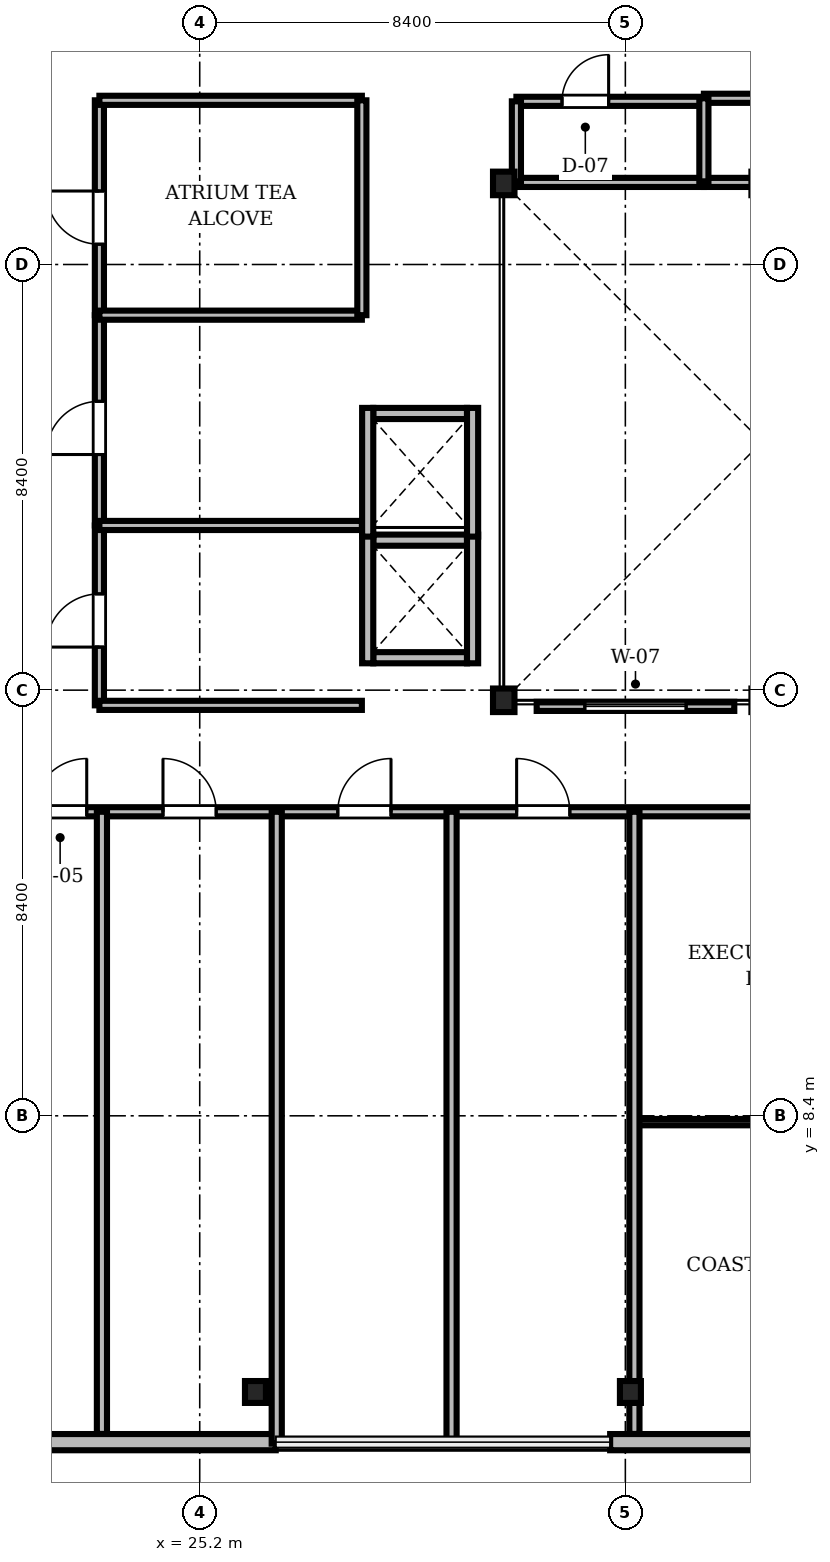
"""IFC4 building model, lengths in metres.
Left out: names, types, materials, properties, quantities, classifications, styles, units other than length and angle.
Written with IfcOpenShell. Run it as: python <this file> out.ifc"""

import sys

from ifc_helpers import new_model, si_unit, direction, frame, frame_2d, origin, origin_2d, place, context, subcontext, project, spatial, rectangle, i_section, extrude, source, transform, mapped, element, fill, save


model = new_model("IFC4")
c1 = context("Model", 3, precision=1e-05, world=origin(), true_north=direction((0.0, 1.0)))
c2 = subcontext(c1, "Body", "Model", "MODEL_VIEW")
j1 = project(units=[si_unit("LENGTHUNIT", "METRE"), si_unit("PLANEANGLEUNIT", "RADIAN")], contexts=[c1])
p1 = place(None, origin())
s1 = spatial("IfcSite", under=j1, at=p1, CompositionType="ELEMENT")
p2 = place(p1, origin())
s2 = spatial("IfcBuilding", under=s1, at=p2, CompositionType="ELEMENT")
p3 = place(p2, frame((0.0, 0.0, 137.2)))
s3 = spatial("IfcBuildingStorey", under=s2, at=p3, CompositionType="ELEMENT", Elevation=137.2)
m1 = source(origin(), c2, "Body", "SweptSolid", [
    extrude(i_section(OverallWidth=0.424, OverallDepth=0.465, WebThickness=0.035, FlangeThickness=0.056, FilletRadius=0.015, at=origin_2d()), origin(), (0.0, 0.0, 1.0), 3.46),
])
for number, where, z_axis, x_axis in (
    (1, (31.2, 16.6, 0.0), (0.0, 0.0, 1.0), (1.0, 0.0, 0.0)),
    (2, (31.2, 26.8, 0.0), (0.0, 0.0, 1.0), (1.0, 0.0, 0.0)),
):
    element("IfcColumn", number, at=place(p3, frame(where, z_axis=z_axis, x_axis=x_axis)), inside=s3, PredefinedType="COLUMN", context=c2, shape_type="MappedRepresentation", body=[
        mapped(m1, transform((0.0, 0.0, 0.0), scale=1.0)),
    ])
m2 = source(origin(), c2, "Body", "SweptSolid", [
    extrude(i_section(OverallWidth=0.414, OverallDepth=0.432, WebThickness=0.026, FlangeThickness=0.04, FilletRadius=0.015, at=origin_2d()), origin(), (0.0, 0.0, 1.0), 3.46),
])
for number, where, z_axis, x_axis in (
    (3, (26.3, 2.95, 0.0), (0.0, 0.0, 1.0), (1.0, 0.0, 0.0)),
    (4, (33.7, 2.95, 0.0), (0.0, 0.0, 1.0), (1.0, 0.0, 0.0)),
):
    element("IfcColumn", number, at=place(p3, frame(where, z_axis=z_axis, x_axis=x_axis)), inside=s3, PredefinedType="COLUMN", context=c2, shape_type="MappedRepresentation", body=[
        mapped(m2, transform((0.0, 0.0, 0.0), scale=1.0)),
    ])
m3 = source(origin(), c2, "Body", "SweptSolid", [
    extrude(rectangle(XDim=15.6, YDim=0.32, at=frame_2d((7.8, 0.0))), origin(), (0.0, 0.0, 1.0), 3.46),
])
p4 = place(p3, frame((11.1, 1.96, 0.0), z_axis=(0.0, 0.0, 1.0), x_axis=(1.0, 0.0, 0.0)))
e5 = element("IfcWall", 5, at=p4, inside=s3, PredefinedType="SOLIDWALL", context=c2, shape_type="MappedRepresentation", body=[
    mapped(m3, transform((0.0, 0.0, 0.0), scale=1.0)),
])
m4 = source(origin(), c2, "Body", "SweptSolid", [
    extrude(rectangle(XDim=2.2, YDim=2.4, at=frame_2d((1.1, 1.2))), frame((0.0, 0.17, 0.0), z_axis=(0.0, -1.0, 0.0), x_axis=(1.0, 0.0, 0.0)), (0.0, 0.0, 1.0), 0.34),
])
p5 = place(p4, frame((3.005, 0.0, 0.72)))
e6 = element("IfcOpeningElement", 6, at=p5, cuts=e5, PredefinedType="OPENING", context=c2, shape_type="MappedRepresentation", body=[
    mapped(m4, transform((0.0, 0.0, 0.0), scale=1.0)),
])
p6 = place(p3, frame((33.3, 1.96, 0.0), z_axis=(0.0, 0.0, 1.0), x_axis=(1.0, 0.0, 0.0)))
e7 = element("IfcWall", 7, at=p6, inside=s3, PredefinedType="SOLIDWALL", context=c2, shape_type="MappedRepresentation", body=[
    mapped(m3, transform((0.0, 0.0, 0.0), scale=1.0)),
])
m5 = source(origin(), c2, "Body", "SweptSolid", [
    extrude(rectangle(XDim=1.4, YDim=2.3, at=frame_2d((0.7, 1.15))), frame((0.0, 0.17, 0.0), z_axis=(0.0, -1.0, 0.0), x_axis=(1.0, 0.0, 0.0)), (0.0, 0.0, 1.0), 0.34),
])
p7 = place(p6, frame((4.59, 0.0, 0.0)))
e8 = element("IfcOpeningElement", 8, at=p7, cuts=e7, PredefinedType="OPENING", context=c2, shape_type="MappedRepresentation", body=[
    mapped(m5, transform((0.0, 0.0, 0.0), scale=1.0)),
])
p8 = place(p6, frame((10.395, 0.0, 0.72)))
e9 = element("IfcOpeningElement", 9, at=p8, cuts=e7, PredefinedType="OPENING", context=c2, shape_type="MappedRepresentation", body=[
    mapped(m4, transform((0.0, 0.0, 0.0), scale=1.0)),
])
m6 = source(origin(), c2, "Body", "SweptSolid", [
    extrude(rectangle(XDim=1.85, YDim=0.22, at=frame_2d((0.925, 0.0))), origin(), (0.0, 0.0, 1.0), 3.46),
])
for number, where, z_axis, x_axis in (
    (10, (28.625, 17.44, 0.0), (0.0, 0.0, 1.0), (1.0, 0.0, 0.0)),
    (11, (28.625, 19.76, 0.0), (0.0, 0.0, 1.0), (1.0, 0.0, 0.0)),
):
    element("IfcWall", number, at=place(p3, frame(where, z_axis=z_axis, x_axis=x_axis)), inside=s3, PredefinedType="SOLIDWALL", context=c2, shape_type="MappedRepresentation", body=[
        mapped(m6, transform((0.0, 0.0, 0.0), scale=1.0)),
    ])
m7 = source(origin(), c2, "Body", "SweptSolid", [
    extrude(rectangle(XDim=2.54, YDim=0.22, at=frame_2d((1.27, 0.0))), origin(), (0.0, 0.0, 1.0), 3.46),
])
for number, where, z_axis, x_axis in (
    (12, (28.515, 17.33, 0.0), (0.0, 0.0, 1.0), (0.0, 1.0, 0.0)),
    (13, (30.585, 17.33, 0.0), (0.0, 0.0, 1.0), (0.0, 1.0, 0.0)),
):
    element("IfcWall", number, at=place(p3, frame(where, z_axis=z_axis, x_axis=x_axis)), inside=s3, PredefinedType="SOLIDWALL", context=c2, shape_type="MappedRepresentation", body=[
        mapped(m7, transform((0.0, 0.0, 0.0), scale=1.0)),
    ])
p9 = place(p3, frame((28.625, 22.26, 0.0), z_axis=(0.0, 0.0, 1.0), x_axis=(1.0, 0.0, 0.0)))
e14 = element("IfcWall", 14, at=p9, inside=s3, PredefinedType="SOLIDWALL", context=c2, shape_type="MappedRepresentation", body=[
    mapped(m6, transform((0.0, 0.0, 0.0), scale=1.0)),
])
for number, where, z_axis, x_axis in (
    (15, (28.515, 19.83, 0.0), (0.0, 0.0, 1.0), (0.0, 1.0, 0.0)),
    (16, (30.585, 19.83, 0.0), (0.0, 0.0, 1.0), (0.0, 1.0, 0.0)),
):
    element("IfcWall", number, at=place(p3, frame(where, z_axis=z_axis, x_axis=x_axis)), inside=s3, PredefinedType="SOLIDWALL", context=c2, shape_type="MappedRepresentation", body=[
        mapped(m7, transform((0.0, 0.0, 0.0), scale=1.0)),
    ])
m8 = source(origin(), c2, "Body", "SweptSolid", [
    extrude(rectangle(XDim=46.156, YDim=0.18, at=frame_2d((23.078, 0.0))), origin(), (0.0, 0.0, 1.0), 2.702),
])
p10 = place(p3, frame((6.922, 14.4, 0.0), z_axis=(0.0, 0.0, 1.0), x_axis=(1.0, 0.0, 0.0)))
e17 = element("IfcWall", 17, at=p10, inside=s3, PredefinedType="PARTITIONING", context=c2, shape_type="MappedRepresentation", body=[
    mapped(m8, transform((0.0, 0.0, 0.0), scale=1.0)),
])
m9 = source(origin(), c2, "Body", "SweptSolid", [
    extrude(rectangle(XDim=1.05, YDim=2.2, at=frame_2d((0.525, 1.1))), frame((0.0, 0.1, 0.0), z_axis=(0.0, -1.0, 0.0), x_axis=(1.0, 0.0, 0.0)), (0.0, 0.0, 1.0), 0.2),
])
p11 = place(p10, frame((14.998, 0.0, 0.0)))
e18 = element("IfcOpeningElement", 18, at=p11, cuts=e17, PredefinedType="OPENING", context=c2, shape_type="MappedRepresentation", body=[
    mapped(m9, transform((0.0, 0.0, 0.0), scale=1.0)),
])
p12 = place(p10, frame((17.553, 0.0, 0.0)))
e19 = element("IfcOpeningElement", 19, at=p12, cuts=e17, PredefinedType="OPENING", context=c2, shape_type="MappedRepresentation", body=[
    mapped(m9, transform((0.0, 0.0, 0.0), scale=1.0)),
])
p13 = place(p10, frame((21.003, 0.0, 0.0)))
e20 = element("IfcOpeningElement", 20, at=p13, cuts=e17, PredefinedType="OPENING", context=c2, shape_type="MappedRepresentation", body=[
    mapped(m9, transform((0.0, 0.0, 0.0), scale=1.0)),
])
p14 = place(p10, frame((24.532, 0.0, 0.0)))
e21 = element("IfcOpeningElement", 21, at=p14, cuts=e17, PredefinedType="OPENING", context=c2, shape_type="MappedRepresentation", body=[
    mapped(m9, transform((0.0, 0.0, 0.0), scale=1.0)),
])
p15 = place(p10, frame((29.342, 0.0, 0.0)))
e22 = element("IfcOpeningElement", 22, at=p15, cuts=e17, PredefinedType="OPENING", context=c2, shape_type="MappedRepresentation", body=[
    mapped(m9, transform((0.0, 0.0, 0.0), scale=1.0)),
])
p16 = place(p10, frame((34.073, 0.0, 0.0)))
e23 = element("IfcOpeningElement", 23, at=p16, cuts=e17, PredefinedType="OPENING", context=c2, shape_type="MappedRepresentation", body=[
    mapped(m9, transform((0.0, 0.0, 0.0), scale=1.0)),
])
p17 = place(p10, frame((37.822, 0.0, 0.0)))
e24 = element("IfcOpeningElement", 24, at=p17, cuts=e17, PredefinedType="OPENING", context=c2, shape_type="MappedRepresentation", body=[
    mapped(m9, transform((0.0, 0.0, 0.0), scale=1.0)),
])
p18 = place(p10, frame((41.828, 0.0, 0.0)))
e25 = element("IfcOpeningElement", 25, at=p18, cuts=e17, PredefinedType="OPENING", context=c2, shape_type="MappedRepresentation", body=[
    mapped(m9, transform((0.0, 0.0, 0.0), scale=1.0)),
])
m10 = source(origin(), c2, "Body", "SweptSolid", [
    extrude(rectangle(XDim=6.011, YDim=0.125, at=frame_2d((3.005, 0.0))), origin(), (0.0, 0.0, 1.0), 2.852),
])
p19 = place(p3, frame((33.779, 8.275, 0.0), z_axis=(0.0, 0.0, 1.0), x_axis=(1.0, 0.0, 0.0)))
e26 = element("IfcWall", 26, at=p19, inside=s3, PredefinedType="PARTITIONING", context=c2, shape_type="MappedRepresentation", body=[
    mapped(m10, transform((0.0, 0.0, 0.0), scale=1.0)),
])
m11 = source(origin(), c2, "Body", "SweptSolid", [
    extrude(rectangle(XDim=0.95, YDim=2.15, at=frame_2d((0.475, 1.075))), frame((0.0, 0.073, 0.0), z_axis=(0.0, -1.0, 0.0), x_axis=(1.0, 0.0, 0.0)), (0.0, 0.0, 1.0), 0.145),
])
p20 = place(p19, frame((2.525, 0.0, 0.0)))
e27 = element("IfcOpeningElement", 27, at=p20, cuts=e26, PredefinedType="OPENING", context=c2, shape_type="MappedRepresentation", body=[
    mapped(m11, transform((0.0, 0.0, 0.0), scale=1.0)),
])
m12 = source(origin(), c2, "Body", "SweptSolid", [
    extrude(rectangle(XDim=4.24, YDim=0.18, at=frame_2d((2.12, 0.0))), origin(), (0.0, 0.0, 1.0), 2.852),
])
p21 = place(p3, frame((23.22, 24.2, 0.0), z_axis=(0.0, 0.0, 1.0), x_axis=(0.0, 1.0, 0.0)))
e28 = element("IfcWall", 28, at=p21, inside=s3, PredefinedType="PARTITIONING", context=c2, shape_type="MappedRepresentation", body=[
    mapped(m12, transform((0.0, 0.0, 0.0), scale=1.0)),
])
p22 = place(p21, frame((1.4, 0.0, 0.0)))
e29 = element("IfcOpeningElement", 29, at=p22, cuts=e28, PredefinedType="OPENING", context=c2, shape_type="MappedRepresentation", body=[
    mapped(m9, transform((0.0, 0.0, 0.0), scale=1.0)),
])
m13 = source(origin(), c2, "Body", "SweptSolid", [
    extrude(rectangle(XDim=4.15, YDim=0.18, at=frame_2d((2.075, 0.0))), origin(), (0.0, 0.0, 1.0), 3.122),
])
p23 = place(p3, frame((23.22, 20.05, 0.0), z_axis=(0.0, 0.0, 1.0), x_axis=(0.0, 1.0, 0.0)))
e30 = element("IfcWall", 30, at=p23, inside=s3, PredefinedType="PARTITIONING", context=c2, shape_type="MappedRepresentation", body=[
    mapped(m13, transform((0.0, 0.0, 0.0), scale=1.0)),
])
p24 = place(p23, frame((1.4, 0.0, 0.0)))
e31 = element("IfcOpeningElement", 31, at=p24, cuts=e30, PredefinedType="OPENING", context=c2, shape_type="MappedRepresentation", body=[
    mapped(m9, transform((0.0, 0.0, 0.0), scale=1.0)),
])
m14 = source(origin(), c2, "Body", "SweptSolid", [
    extrude(rectangle(XDim=3.7, YDim=0.18, at=frame_2d((1.85, 0.0))), origin(), (0.0, 0.0, 1.0), 3.092),
])
p25 = place(p3, frame((31.45, 28.42, 0.0), z_axis=(0.0, 0.0, 1.0), x_axis=(1.0, 0.0, 0.0)))
e32 = element("IfcWall", 32, at=p25, inside=s3, PredefinedType="PARTITIONING", context=c2, shape_type="MappedRepresentation", body=[
    mapped(m14, transform((0.0, 0.0, 0.0), scale=1.0)),
])
m15 = source(origin(), c2, "Body", "SweptSolid", [
    extrude(rectangle(XDim=0.92, YDim=2.1, at=frame_2d((0.46, 1.05))), frame((0.0, 0.1, 0.0), z_axis=(0.0, -1.0, 0.0), x_axis=(1.0, 0.0, 0.0)), (0.0, 0.0, 1.0), 0.2),
])
p26 = place(p25, frame((0.9, 0.0, 0.0)))
e33 = element("IfcOpeningElement", 33, at=p26, cuts=e32, PredefinedType="OPENING", context=c2, shape_type="MappedRepresentation", body=[
    mapped(m15, transform((0.0, 0.0, 0.0), scale=1.0)),
])
m16 = source(origin(), c2, "Body", "SweptSolid", [
    extrude(rectangle(XDim=3.55, YDim=0.18, at=frame_2d((1.775, 0.0))), origin(), (0.0, 0.0, 1.0), 2.852),
])
p27 = place(p3, frame((23.22, 16.5, 0.0), z_axis=(0.0, 0.0, 1.0), x_axis=(0.0, 1.0, 0.0)))
e34 = element("IfcWall", 34, at=p27, inside=s3, PredefinedType="PARTITIONING", context=c2, shape_type="MappedRepresentation", body=[
    mapped(m16, transform((0.0, 0.0, 0.0), scale=1.0)),
])
p28 = place(p27, frame((1.15, 0.0, 0.0)))
e35 = element("IfcOpeningElement", 35, at=p28, cuts=e34, PredefinedType="OPENING", context=c2, shape_type="MappedRepresentation", body=[
    mapped(m9, transform((0.0, 0.0, 0.0), scale=1.0)),
])
m17 = source(origin(), c2, "Body", "SweptSolid", [
    extrude(rectangle(XDim=3.37, YDim=0.18, at=frame_2d((1.685, 0.0))), origin(), (0.0, 0.0, 1.0), 3.46),
])
p29 = place(p3, frame((35.15, 28.48, 0.0), z_axis=(0.0, 0.0, 1.0), x_axis=(1.0, 0.0, 0.0)))
e36 = element("IfcWall", 36, at=p29, inside=s3, PredefinedType="PARTITIONING", context=c2, shape_type="MappedRepresentation", body=[
    mapped(m17, transform((0.0, 0.0, 0.0), scale=1.0)),
])
m18 = source(origin(), c2, "Body", "SweptSolid", [
    extrude(rectangle(XDim=0.95, YDim=2.15, at=frame_2d((0.475, 1.075))), frame((0.0, 0.1, 0.0), z_axis=(0.0, -1.0, 0.0), x_axis=(1.0, 0.0, 0.0)), (0.0, 0.0, 1.0), 0.2),
])
p30 = place(p29, frame((1.775, 0.0, 0.0)))
e37 = element("IfcOpeningElement", 37, at=p30, cuts=e36, PredefinedType="OPENING", context=c2, shape_type="MappedRepresentation", body=[
    mapped(m18, transform((0.0, 0.0, 0.0), scale=1.0)),
])
m19 = source(origin(), c2, "Body", "SweptSolid", [
    extrude(rectangle(XDim=12.278, YDim=0.2, at=frame_2d((6.139, 0.0))), origin(), (0.0, 0.0, 1.0), 2.702),
])
p31 = place(p3, frame((23.27, 2.122, 0.0), z_axis=(0.0, 0.0, 1.0), x_axis=(0.0, 1.0, 0.0)))
e38 = element("IfcWall", 38, at=p31, inside=s3, PredefinedType="PARTITIONING", context=c2, shape_type="MappedRepresentation", body=[
    mapped(m19, transform((0.0, 0.0, 0.0), scale=1.0)),
])
m20 = source(origin(), c2, "Body", "SweptSolid", [
    extrude(rectangle(XDim=12.47, YDim=0.2, at=frame_2d((6.235, 0.0))), origin(), (0.0, 0.0, 1.0), 2.702),
])
for number, where, z_axis, x_axis in (
    (39, (26.72, 1.93, 0.0), (0.0, 0.0, 1.0), (0.0, 1.0, 0.0)),
    (40, (30.17, 1.93, 0.0), (0.0, 0.0, 1.0), (0.0, 1.0, 0.0)),
):
    element("IfcWall", number, at=place(p3, frame(where, z_axis=z_axis, x_axis=x_axis)), inside=s3, PredefinedType="PARTITIONING", context=c2, shape_type="MappedRepresentation", body=[
        mapped(m20, transform((0.0, 0.0, 0.0), scale=1.0)),
    ])
p32 = place(p3, frame((33.779, 2.122, 0.0), z_axis=(0.0, 0.0, 1.0), x_axis=(0.0, 1.0, 0.0)))
e41 = element("IfcWall", 41, at=p32, inside=s3, PredefinedType="PARTITIONING", context=c2, shape_type="MappedRepresentation", body=[
    mapped(m19, transform((0.0, 0.0, 0.0), scale=1.0)),
])
m21 = source(origin(), c2, "Body", "SweptSolid", [
    extrude(rectangle(XDim=5.18, YDim=0.18, at=frame_2d((2.59, 0.0))), origin(), (0.0, 0.0, 1.0), 3.46),
])
for number, where, z_axis, x_axis in (
    (42, (23.22, 16.5, 0.0), (0.0, 0.0, 1.0), (1.0, 0.0, 0.0)),
    (43, (23.22, 20.05, 0.0), (0.0, 0.0, 1.0), (1.0, 0.0, 0.0)),
    (44, (23.22, 24.2, 0.0), (0.0, 0.0, 1.0), (1.0, 0.0, 0.0)),
    (45, (23.22, 28.44, 0.0), (0.0, 0.0, 1.0), (1.0, 0.0, 0.0)),
):
    element("IfcWall", number, at=place(p3, frame(where, z_axis=z_axis, x_axis=x_axis)), inside=s3, PredefinedType="PARTITIONING", context=c2, shape_type="MappedRepresentation", body=[
        mapped(m21, transform((0.0, 0.0, 0.0), scale=1.0)),
    ])
p33 = place(p3, frame((28.4, 24.2, 0.0), z_axis=(0.0, 0.0, 1.0), x_axis=(0.0, 1.0, 0.0)))
e46 = element("IfcWall", 46, at=p33, inside=s3, PredefinedType="PARTITIONING", context=c2, shape_type="MappedRepresentation", body=[
    mapped(m12, transform((0.0, 0.0, 0.0), scale=1.0)),
])
m22 = source(origin(), c2, "Body", "SweptSolid", [
    extrude(rectangle(XDim=3.7, YDim=0.18, at=frame_2d((1.85, 0.0))), origin(), (0.0, 0.0, 1.0), 3.002),
])
p34 = place(p3, frame((31.45, 26.82, 0.0), z_axis=(0.0, 0.0, 1.0), x_axis=(1.0, 0.0, 0.0)))
e47 = element("IfcWall", 47, at=p34, inside=s3, PredefinedType="PARTITIONING", context=c2, shape_type="MappedRepresentation", body=[
    mapped(m22, transform((0.0, 0.0, 0.0), scale=1.0)),
])
m23 = source(origin(), c2, "Body", "SweptSolid", [
    extrude(rectangle(XDim=3.37, YDim=0.18, at=frame_2d((1.685, 0.0))), origin(), (0.0, 0.0, 1.0), 3.002),
])
p35 = place(p3, frame((35.15, 26.82, 0.0), z_axis=(0.0, 0.0, 1.0), x_axis=(1.0, 0.0, 0.0)))
e48 = element("IfcWall", 48, at=p35, inside=s3, PredefinedType="PARTITIONING", context=c2, shape_type="MappedRepresentation", body=[
    mapped(m23, transform((0.0, 0.0, 0.0), scale=1.0)),
])
m24 = source(origin(), c2, "Body", "SweptSolid", [
    extrude(rectangle(XDim=1.66, YDim=0.18, at=frame_2d((0.83, 0.0))), origin(), (0.0, 0.0, 1.0), 3.002),
])
p36 = place(p3, frame((35.15, 26.82, 0.0), z_axis=(0.0, 0.0, 1.0), x_axis=(0.0, 1.0, 0.0)))
e49 = element("IfcWall", 49, at=p36, inside=s3, PredefinedType="PARTITIONING", context=c2, shape_type="MappedRepresentation", body=[
    mapped(m24, transform((0.0, 0.0, 0.0), scale=1.0)),
])
m25 = source(origin(), c2, "Body", "SweptSolid", [
    extrude(rectangle(XDim=1.6, YDim=0.18, at=frame_2d((0.8, 0.0))), origin(), (0.0, 0.0, 1.0), 3.002),
])
p37 = place(p3, frame((31.45, 26.82, 0.0), z_axis=(0.0, 0.0, 1.0), x_axis=(0.0, 1.0, 0.0)))
e50 = element("IfcWall", 50, at=p37, inside=s3, PredefinedType="PARTITIONING", context=c2, shape_type="MappedRepresentation", body=[
    mapped(m25, transform((0.0, 0.0, 0.0), scale=1.0)),
])
m26 = source(origin(), c2, "Body", "SweptSolid", [
    extrude(rectangle(XDim=3.9, YDim=0.18, at=frame_2d((1.95, 0.0))), origin(), (0.0, 0.0, 1.0), 3.002),
])
p38 = place(p3, frame((31.85, 16.48, 0.0), z_axis=(0.0, 0.0, 1.0), x_axis=(1.0, 0.0, 0.0)))
e51 = element("IfcWall", 51, at=p38, inside=s3, PredefinedType="PARTITIONING", context=c2, shape_type="MappedRepresentation", body=[
    mapped(m26, transform((0.0, 0.0, 0.0), scale=1.0)),
])
m27 = source(origin(), c2, "Body", "SweptSolid", [
    extrude(rectangle(XDim=2.0, YDim=1.9, at=frame_2d((1.0, 0.95))), frame((0.0, 0.1, 0.0), z_axis=(0.0, -1.0, 0.0), x_axis=(1.0, 0.0, 0.0)), (0.0, 0.0, 1.0), 0.2),
])
p39 = place(p38, frame((0.95, 0.0, 0.55)))
e52 = element("IfcOpeningElement", 52, at=p39, cuts=e51, PredefinedType="OPENING", context=c2, shape_type="MappedRepresentation", body=[
    mapped(m27, transform((0.0, 0.0, 0.0), scale=1.0)),
])
m28 = source(origin(), c2, "Body", "SweptSolid", [
    extrude(rectangle(XDim=1.05, YDim=2.2, at=frame_2d((0.525, 1.1))), frame((0.0, 0.025, 0.0), z_axis=(0.0, -1.0, 0.0), x_axis=(1.0, 0.0, 0.0)), (0.0, 0.0, 1.0), 0.05),
])
p40 = place(p11, origin())
e53 = element("IfcDoor", 53, at=p40, inside=s3, OperationType="SINGLE_SWING_RIGHT", PredefinedType="DOOR", context=c2, shape_type="MappedRepresentation", body=[
    mapped(m28, transform((0.0, 0.0, 0.0), scale=1.0)),
])
fill(e18, e53)
p41 = place(p12, origin())
e54 = element("IfcDoor", 54, at=p41, inside=s3, OperationType="SINGLE_SWING_LEFT", PredefinedType="DOOR", context=c2, shape_type="MappedRepresentation", body=[
    mapped(m28, transform((0.0, 0.0, 0.0), scale=1.0)),
])
fill(e19, e54)
p42 = place(p13, origin())
e55 = element("IfcDoor", 55, at=p42, inside=s3, OperationType="SINGLE_SWING_RIGHT", PredefinedType="DOOR", context=c2, shape_type="MappedRepresentation", body=[
    mapped(m28, transform((0.0, 0.0, 0.0), scale=1.0)),
])
fill(e20, e55)
p43 = place(p14, origin())
e56 = element("IfcDoor", 56, at=p43, inside=s3, OperationType="SINGLE_SWING_LEFT", PredefinedType="DOOR", context=c2, shape_type="MappedRepresentation", body=[
    mapped(m28, transform((0.0, 0.0, 0.0), scale=1.0)),
])
fill(e21, e56)
p44 = place(p22, origin())
e57 = element("IfcDoor", 57, at=p44, inside=s3, OperationType="SINGLE_SWING_RIGHT", PredefinedType="DOOR", context=c2, shape_type="MappedRepresentation", body=[
    mapped(m28, transform((0.0, 0.0, 0.0), scale=1.0)),
])
fill(e29, e57)
p45 = place(p24, origin())
e58 = element("IfcDoor", 58, at=p45, inside=s3, OperationType="SINGLE_SWING_LEFT", PredefinedType="DOOR", context=c2, shape_type="MappedRepresentation", body=[
    mapped(m28, transform((0.0, 0.0, 0.0), scale=1.0)),
])
fill(e31, e58)
m29 = source(origin(), c2, "Body", "SweptSolid", [
    extrude(rectangle(XDim=0.92, YDim=2.1, at=frame_2d((0.46, 1.05))), frame((0.0, 0.025, 0.0), z_axis=(0.0, -1.0, 0.0), x_axis=(1.0, 0.0, 0.0)), (0.0, 0.0, 1.0), 0.05),
])
p46 = place(p26, origin())
e59 = element("IfcDoor", 59, at=p46, inside=s3, OperationType="SINGLE_SWING_RIGHT", PredefinedType="DOOR", context=c2, shape_type="MappedRepresentation", body=[
    mapped(m29, transform((0.0, 0.0, 0.0), scale=1.0)),
])
fill(e33, e59)
p47 = place(p28, origin())
e60 = element("IfcDoor", 60, at=p47, inside=s3, OperationType="SINGLE_SWING_LEFT", PredefinedType="DOOR", context=c2, shape_type="MappedRepresentation", body=[
    mapped(m28, transform((0.0, 0.0, 0.0), scale=1.0)),
])
fill(e35, e60)
m30 = source(origin(), c2, "Body", "SweptSolid", [
    extrude(rectangle(XDim=2.0, YDim=1.9, at=frame_2d((1.0, 0.95))), frame((0.0, 0.03, 0.0), z_axis=(0.0, -1.0, 0.0), x_axis=(1.0, 0.0, 0.0)), (0.0, 0.0, 1.0), 0.06),
])
p48 = place(p39, origin())
e61 = element("IfcWindow", 61, at=p48, inside=s3, PartitioningType="SINGLE_PANEL", PredefinedType="WINDOW", context=c2, shape_type="MappedRepresentation", body=[
    mapped(m30, transform((0.0, 0.0, 0.0), scale=1.0)),
])
fill(e52, e61)
save(model, sys.argv[1])
